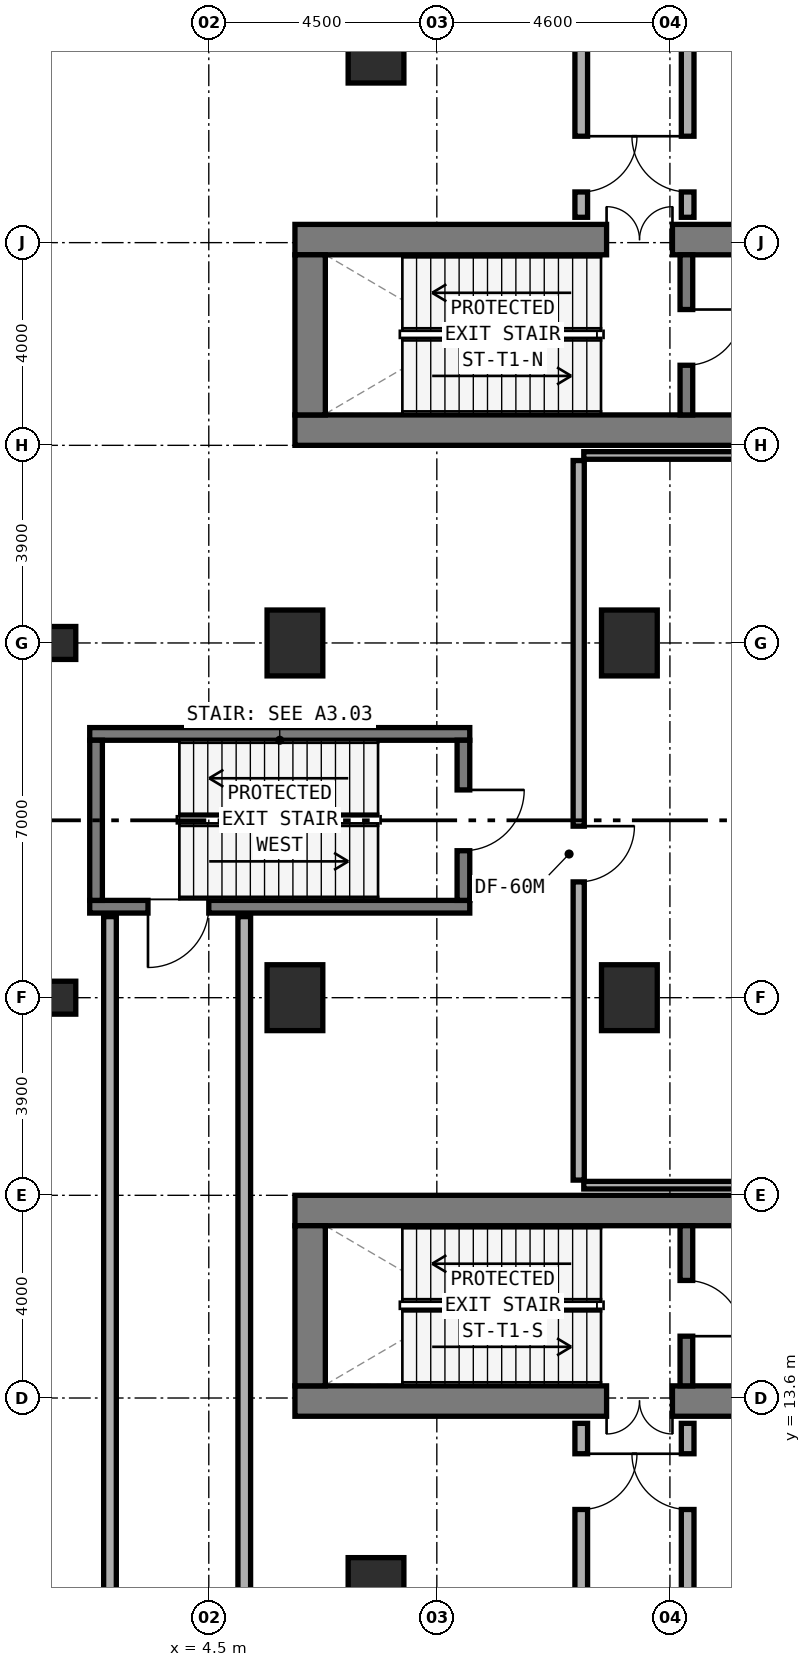
"""IFC4 building model, lengths in metres.
Left out: names, types, materials, properties, quantities, classifications, styles, units other than length and angle.
Written with IfcOpenShell. Run it as: python <this file> out.ifc"""

import sys

from ifc_helpers import new_model, si_unit, direction, frame, frame_2d, origin, origin_2d, place, context, subcontext, project, spatial, rectangle, extrude, element, fill, save


model = new_model("IFC4")
c1 = context("Model", 3, precision=1e-05, world=origin(), true_north=direction((0.0, 1.0)))
c2 = subcontext(c1, "Body", "Model", "MODEL_VIEW")
j1 = project(units=[si_unit("LENGTHUNIT", "METRE"), si_unit("PLANEANGLEUNIT", "RADIAN")], contexts=[c1])
p1 = place(None, origin())
s1 = spatial("IfcSite", under=j1, at=p1, CompositionType="ELEMENT")
p2 = place(p1, origin())
s2 = spatial("IfcBuilding", under=s1, at=p2, CompositionType="ELEMENT")
p3 = place(p2, origin())
s3 = spatial("IfcBuildingStorey", under=s2, at=p3, CompositionType="ELEMENT", Elevation=0.0)
p4 = place(p3, frame((6.2, 32.7, 0.0), z_axis=(0.0, 0.0, 1.0), x_axis=(1.0, 0.0, 0.0)))
e1 = element("IfcWall", 1, at=p4, inside=s3, PredefinedType="SHEAR", context=c2, shape_type="SweptSolid", body=[
    extrude(rectangle(XDim=24.8, YDim=0.6, at=frame_2d((12.4, 0.0))), origin(), (0.0, 0.0, 1.0), 5.4),
])
p5 = place(p3, frame((6.2, 36.46, 0.0), z_axis=(0.0, 0.0, 1.0), x_axis=(1.0, 0.0, 0.0)))
e2 = element("IfcWall", 2, at=p5, inside=s3, PredefinedType="SHEAR", context=c2, shape_type="SweptSolid", body=[
    extrude(rectangle(XDim=24.8, YDim=0.6, at=frame_2d((12.4, 0.0))), origin(), (0.0, 0.0, 1.0), 5.4),
])
p6 = place(p5, frame((9.35, 0.0, 0.0)))
e3 = element("IfcOpeningElement", 3, at=p6, cuts=e2, PredefinedType="OPENING", context=c2, shape_type="SweptSolid", body=[
    extrude(rectangle(XDim=1.2, YDim=2.15, at=frame_2d((0.6, 1.075))), frame((0.0, 0.31, 0.0), z_axis=(0.0, -1.0, 0.0), x_axis=(1.0, 0.0, 0.0)), (0.0, 0.0, 1.0), 0.62),
])
p7 = place(p5, frame((6.15, 0.0, 0.0)))
e4 = element("IfcOpeningElement", 4, at=p7, cuts=e2, PredefinedType="OPENING", context=c2, shape_type="SweptSolid", body=[
    extrude(rectangle(XDim=1.3, YDim=2.15, at=frame_2d((0.65, 1.075))), frame((0.0, 0.31, 0.0), z_axis=(0.0, -1.0, 0.0), x_axis=(1.0, 0.0, 0.0)), (0.0, 0.0, 1.0), 0.62),
])
p8 = place(p5, frame((17.14, 0.0, 0.0)))
e5 = element("IfcOpeningElement", 5, at=p8, cuts=e2, PredefinedType="OPENING", context=c2, shape_type="SweptSolid", body=[
    extrude(rectangle(XDim=0.85, YDim=2.1, at=frame_2d((0.425, 1.05))), frame((0.0, 0.31, 0.0), z_axis=(0.0, -1.0, 0.0), x_axis=(1.0, 0.0, 0.0)), (0.0, 0.0, 1.0), 0.62),
])
p9 = place(p5, frame((18.983, 0.0, 0.0)))
e6 = element("IfcOpeningElement", 6, at=p9, cuts=e2, PredefinedType="OPENING", context=c2, shape_type="SweptSolid", body=[
    extrude(rectangle(XDim=1.1, YDim=2.15, at=frame_2d((0.55, 1.075))), frame((0.0, 0.31, 0.0), z_axis=(0.0, -1.0, 0.0), x_axis=(1.0, 0.0, 0.0)), (0.0, 0.0, 1.0), 0.62),
])
p10 = place(p5, frame((20.85, 0.0, 0.0)))
e7 = element("IfcOpeningElement", 7, at=p10, cuts=e2, PredefinedType="OPENING", context=c2, shape_type="SweptSolid", body=[
    extrude(rectangle(XDim=1.1, YDim=2.15, at=frame_2d((0.55, 1.075))), frame((0.0, 0.31, 0.0), z_axis=(0.0, -1.0, 0.0), x_axis=(1.0, 0.0, 0.0)), (0.0, 0.0, 1.0), 0.62),
])
p11 = place(p5, frame((22.716, 0.0, 0.0)))
e8 = element("IfcOpeningElement", 8, at=p11, cuts=e2, PredefinedType="OPENING", context=c2, shape_type="SweptSolid", body=[
    extrude(rectangle(XDim=1.1, YDim=2.15, at=frame_2d((0.55, 1.075))), frame((0.0, 0.31, 0.0), z_axis=(0.0, -1.0, 0.0), x_axis=(1.0, 0.0, 0.0)), (0.0, 0.0, 1.0), 0.62),
])
p12 = place(p3, frame((6.5, 33.0, 0.0), z_axis=(0.0, 0.0, 1.0), x_axis=(0.0, 1.0, 0.0)))
e9 = element("IfcWall", 9, at=p12, inside=s3, PredefinedType="SHEAR", context=c2, shape_type="SweptSolid", body=[
    extrude(rectangle(XDim=3.16, YDim=0.6, at=frame_2d((1.58, 0.0))), origin(), (0.0, 0.0, 1.0), 5.4),
])
p13 = place(p3, frame((13.925, 33.0, 0.0), z_axis=(0.0, 0.0, 1.0), x_axis=(0.0, 1.0, 0.0)))
e10 = element("IfcWall", 10, at=p13, inside=s3, PredefinedType="STANDARD", context=c2, shape_type="SweptSolid", body=[
    extrude(rectangle(XDim=3.16, YDim=0.25, at=frame_2d((1.58, 0.0))), origin(), (0.0, 0.0, 1.0), 5.05),
])
p14 = place(p13, frame((0.98, 0.0, 0.0)))
e11 = element("IfcOpeningElement", 11, at=p14, cuts=e10, PredefinedType="OPENING", context=c2, shape_type="SweptSolid", body=[
    extrude(rectangle(XDim=1.1, YDim=2.15, at=frame_2d((0.55, 1.075))), frame((0.0, 0.135, 0.0), z_axis=(0.0, -1.0, 0.0), x_axis=(1.0, 0.0, 0.0)), (0.0, 0.0, 1.0), 0.27),
])
p15 = place(p3, frame((6.2, 13.54, 0.0), z_axis=(0.0, 0.0, 1.0), x_axis=(1.0, 0.0, 0.0)))
e12 = element("IfcWall", 12, at=p15, inside=s3, PredefinedType="SHEAR", context=c2, shape_type="SweptSolid", body=[
    extrude(rectangle(XDim=24.8, YDim=0.6, at=frame_2d((12.4, 0.0))), origin(), (0.0, 0.0, 1.0), 5.4),
])
p16 = place(p15, frame((9.35, 0.0, 0.0)))
e13 = element("IfcOpeningElement", 13, at=p16, cuts=e12, PredefinedType="OPENING", context=c2, shape_type="SweptSolid", body=[
    extrude(rectangle(XDim=1.2, YDim=2.15, at=frame_2d((0.6, 1.075))), frame((0.0, 0.31, 0.0), z_axis=(0.0, -1.0, 0.0), x_axis=(1.0, 0.0, 0.0)), (0.0, 0.0, 1.0), 0.62),
])
p17 = place(p15, frame((6.15, 0.0, 0.0)))
e14 = element("IfcOpeningElement", 14, at=p17, cuts=e12, PredefinedType="OPENING", context=c2, shape_type="SweptSolid", body=[
    extrude(rectangle(XDim=1.3, YDim=2.15, at=frame_2d((0.65, 1.075))), frame((0.0, 0.31, 0.0), z_axis=(0.0, -1.0, 0.0), x_axis=(1.0, 0.0, 0.0)), (0.0, 0.0, 1.0), 0.62),
])
p18 = place(p15, frame((17.14, 0.0, 0.0)))
e15 = element("IfcOpeningElement", 15, at=p18, cuts=e12, PredefinedType="OPENING", context=c2, shape_type="SweptSolid", body=[
    extrude(rectangle(XDim=0.85, YDim=2.1, at=frame_2d((0.425, 1.05))), frame((0.0, 0.31, 0.0), z_axis=(0.0, -1.0, 0.0), x_axis=(1.0, 0.0, 0.0)), (0.0, 0.0, 1.0), 0.62),
])
p19 = place(p15, frame((18.983, 0.0, 0.0)))
e16 = element("IfcOpeningElement", 16, at=p19, cuts=e12, PredefinedType="OPENING", context=c2, shape_type="SweptSolid", body=[
    extrude(rectangle(XDim=1.1, YDim=2.15, at=frame_2d((0.55, 1.075))), frame((0.0, 0.31, 0.0), z_axis=(0.0, -1.0, 0.0), x_axis=(1.0, 0.0, 0.0)), (0.0, 0.0, 1.0), 0.62),
])
p20 = place(p15, frame((20.85, 0.0, 0.0)))
e17 = element("IfcOpeningElement", 17, at=p20, cuts=e12, PredefinedType="OPENING", context=c2, shape_type="SweptSolid", body=[
    extrude(rectangle(XDim=1.1, YDim=2.15, at=frame_2d((0.55, 1.075))), frame((0.0, 0.31, 0.0), z_axis=(0.0, -1.0, 0.0), x_axis=(1.0, 0.0, 0.0)), (0.0, 0.0, 1.0), 0.62),
])
p21 = place(p15, frame((22.716, 0.0, 0.0)))
e18 = element("IfcOpeningElement", 18, at=p21, cuts=e12, PredefinedType="OPENING", context=c2, shape_type="SweptSolid", body=[
    extrude(rectangle(XDim=1.1, YDim=2.15, at=frame_2d((0.55, 1.075))), frame((0.0, 0.31, 0.0), z_axis=(0.0, -1.0, 0.0), x_axis=(1.0, 0.0, 0.0)), (0.0, 0.0, 1.0), 0.62),
])
p22 = place(p3, frame((6.2, 17.3, 0.0), z_axis=(0.0, 0.0, 1.0), x_axis=(1.0, 0.0, 0.0)))
e19 = element("IfcWall", 19, at=p22, inside=s3, PredefinedType="SHEAR", context=c2, shape_type="SweptSolid", body=[
    extrude(rectangle(XDim=24.8, YDim=0.6, at=frame_2d((12.4, 0.0))), origin(), (0.0, 0.0, 1.0), 5.4),
])
p23 = place(p3, frame((6.5, 13.84, 0.0), z_axis=(0.0, 0.0, 1.0), x_axis=(0.0, 1.0, 0.0)))
e20 = element("IfcWall", 20, at=p23, inside=s3, PredefinedType="SHEAR", context=c2, shape_type="SweptSolid", body=[
    extrude(rectangle(XDim=3.16, YDim=0.6, at=frame_2d((1.58, 0.0))), origin(), (0.0, 0.0, 1.0), 5.4),
])
p24 = place(p3, frame((13.925, 13.84, 0.0), z_axis=(0.0, 0.0, 1.0), x_axis=(0.0, 1.0, 0.0)))
e21 = element("IfcWall", 21, at=p24, inside=s3, PredefinedType="STANDARD", context=c2, shape_type="SweptSolid", body=[
    extrude(rectangle(XDim=3.16, YDim=0.25, at=frame_2d((1.58, 0.0))), origin(), (0.0, 0.0, 1.0), 5.05),
])
p25 = place(p24, frame((0.98, 0.0, 0.0)))
e22 = element("IfcOpeningElement", 22, at=p25, cuts=e21, PredefinedType="OPENING", context=c2, shape_type="SweptSolid", body=[
    extrude(rectangle(XDim=1.1, YDim=2.15, at=frame_2d((0.55, 1.075))), frame((0.0, 0.135, 0.0), z_axis=(0.0, -1.0, 0.0), x_axis=(1.0, 0.0, 0.0)), (0.0, 0.0, 1.0), 0.27),
])
p26 = place(p3, frame((2.15, 23.295, 0.0), z_axis=(0.0, 0.0, 1.0), x_axis=(1.0, 0.0, 0.0)))
e23 = element("IfcWall", 23, at=p26, inside=s3, PredefinedType="STANDARD", context=c2, shape_type="SweptSolid", body=[
    extrude(rectangle(XDim=7.5, YDim=0.25, at=frame_2d((3.75, 0.0))), origin(), (0.0, 0.0, 1.0), 5.4),
])
p27 = place(p26, frame((1.15, 0.0, 0.0)))
e24 = element("IfcOpeningElement", 24, at=p27, cuts=e23, PredefinedType="OPENING", context=c2, shape_type="SweptSolid", body=[
    extrude(rectangle(XDim=1.2, YDim=2.15, at=frame_2d((0.6, 1.075))), frame((0.0, 0.135, 0.0), z_axis=(0.0, -1.0, 0.0), x_axis=(1.0, 0.0, 0.0)), (0.0, 0.0, 1.0), 0.27),
])
p28 = place(p3, frame((2.15, 26.705, 0.0), z_axis=(0.0, 0.0, 1.0), x_axis=(1.0, 0.0, 0.0)))
e25 = element("IfcWall", 25, at=p28, inside=s3, PredefinedType="STANDARD", context=c2, shape_type="SweptSolid", body=[
    extrude(rectangle(XDim=7.5, YDim=0.25, at=frame_2d((3.75, 0.0))), origin(), (0.0, 0.0, 1.0), 5.4),
])
p29 = place(p3, frame((2.275, 23.42, 0.0), z_axis=(0.0, 0.0, 1.0), x_axis=(0.0, 1.0, 0.0)))
e26 = element("IfcWall", 26, at=p29, inside=s3, PredefinedType="STANDARD", context=c2, shape_type="SweptSolid", body=[
    extrude(rectangle(XDim=3.16, YDim=0.25, at=frame_2d((1.58, 0.0))), origin(), (0.0, 0.0, 1.0), 5.4),
])
p30 = place(p3, frame((9.525, 23.42, 0.0), z_axis=(0.0, 0.0, 1.0), x_axis=(0.0, 1.0, 0.0)))
e27 = element("IfcWall", 27, at=p30, inside=s3, PredefinedType="STANDARD", context=c2, shape_type="SweptSolid", body=[
    extrude(rectangle(XDim=3.16, YDim=0.25, at=frame_2d((1.58, 0.0))), origin(), (0.0, 0.0, 1.0), 5.4),
])
p31 = place(p30, frame((0.98, 0.0, 0.0)))
e28 = element("IfcOpeningElement", 28, at=p31, cuts=e27, PredefinedType="OPENING", context=c2, shape_type="SweptSolid", body=[
    extrude(rectangle(XDim=1.2, YDim=2.15, at=frame_2d((0.6, 1.075))), frame((0.0, 0.135, 0.0), z_axis=(0.0, -1.0, 0.0), x_axis=(1.0, 0.0, 0.0)), (0.0, 0.0, 1.0), 0.27),
])
for number, where, z_axis, x_axis in (
    (29, (6.2, 21.5, 0.0), (0.0, 0.0, 1.0), (1.0, 0.0, 0.0)),
    (30, (6.2, 28.5, 0.0), (0.0, 0.0, 1.0), (1.0, 0.0, 0.0)),
    (31, (7.8, 9.8, 0.0), (0.0, 0.0, 1.0), (1.0, 0.0, 0.0)),
    (32, (7.8, 40.2, 0.0), (0.0, 0.0, 1.0), (1.0, 0.0, 0.0)),
    (33, (12.8, 21.5, 0.0), (0.0, 0.0, 1.0), (1.0, 0.0, 0.0)),
    (34, (12.8, 28.5, 0.0), (0.0, 0.0, 1.0), (1.0, 0.0, 0.0)),
):
    element("IfcColumn", number, at=place(p3, frame(where, z_axis=z_axis, x_axis=x_axis)), inside=s3, PredefinedType="COLUMN", context=c2, shape_type="SweptSolid", body=[
        extrude(rectangle(XDim=1.1, YDim=1.3, at=origin_2d()), origin(), (0.0, 0.0, 1.0), 5.4),
    ])
for number, where, z_axis, x_axis in (
    (35, (1.6, 21.5, 0.0), (0.0, 0.0, 1.0), (1.0, 0.0, 0.0)),
    (36, (1.6, 28.5, 0.0), (0.0, 0.0, 1.0), (1.0, 0.0, 0.0)),
):
    element("IfcColumn", number, at=place(p3, frame(where, z_axis=z_axis, x_axis=x_axis)), inside=s3, PredefinedType="PILASTER", context=c2, shape_type="SweptSolid", body=[
        extrude(rectangle(XDim=0.55, YDim=0.65, at=origin_2d()), origin(), (0.0, 0.0, 1.0), 5.4),
    ])
p32 = place(p3, frame((11.85, 36.9, 0.0), z_axis=(0.0, 0.0, 1.0), x_axis=(0.0, 1.0, 0.0)))
e37 = element("IfcWall", 37, at=p32, inside=s3, PredefinedType="SOLIDWALL", context=c2, shape_type="SweptSolid", body=[
    extrude(rectangle(XDim=12.65, YDim=0.25, at=frame_2d((6.325, 0.0))), origin(), (0.0, 0.0, 1.0), 4.225),
])
p33 = place(p32, frame((0.5, 0.0, 0.0)))
e38 = element("IfcOpeningElement", 38, at=p33, cuts=e37, PredefinedType="OPENING", context=c2, shape_type="SweptSolid", body=[
    extrude(rectangle(XDim=1.1, YDim=2.15, at=frame_2d((0.55, 1.075))), frame((0.0, 0.135, 0.0), z_axis=(0.0, -1.0, 0.0), x_axis=(1.0, 0.0, 0.0)), (0.0, 0.0, 1.0), 0.27),
])
p34 = place(p3, frame((13.95, 36.9, 0.0), z_axis=(0.0, 0.0, 1.0), x_axis=(0.0, 1.0, 0.0)))
e39 = element("IfcWall", 39, at=p34, inside=s3, PredefinedType="SOLIDWALL", context=c2, shape_type="SweptSolid", body=[
    extrude(rectangle(XDim=12.65, YDim=0.25, at=frame_2d((6.325, 0.0))), origin(), (0.0, 0.0, 1.0), 4.225),
])
p35 = place(p34, frame((0.5, 0.0, 0.0)))
e40 = element("IfcOpeningElement", 40, at=p35, cuts=e39, PredefinedType="OPENING", context=c2, shape_type="SweptSolid", body=[
    extrude(rectangle(XDim=1.1, YDim=2.15, at=frame_2d((0.55, 1.075))), frame((0.0, 0.135, 0.0), z_axis=(0.0, -1.0, 0.0), x_axis=(1.0, 0.0, 0.0)), (0.0, 0.0, 1.0), 0.27),
])
p36 = place(p3, frame((11.85, 0.45, 0.0), z_axis=(0.0, 0.0, 1.0), x_axis=(0.0, 1.0, 0.0)))
e41 = element("IfcWall", 41, at=p36, inside=s3, PredefinedType="SOLIDWALL", context=c2, shape_type="SweptSolid", body=[
    extrude(rectangle(XDim=12.65, YDim=0.25, at=frame_2d((6.325, 0.0))), origin(), (0.0, 0.0, 1.0), 4.225),
])
p37 = place(p36, frame((10.95, 0.0, 0.0)))
e42 = element("IfcOpeningElement", 42, at=p37, cuts=e41, PredefinedType="OPENING", context=c2, shape_type="SweptSolid", body=[
    extrude(rectangle(XDim=1.1, YDim=2.15, at=frame_2d((0.55, 1.075))), frame((0.0, 0.135, 0.0), z_axis=(0.0, -1.0, 0.0), x_axis=(1.0, 0.0, 0.0)), (0.0, 0.0, 1.0), 0.27),
])
p38 = place(p3, frame((13.95, 0.45, 0.0), z_axis=(0.0, 0.0, 1.0), x_axis=(0.0, 1.0, 0.0)))
e43 = element("IfcWall", 43, at=p38, inside=s3, PredefinedType="SOLIDWALL", context=c2, shape_type="SweptSolid", body=[
    extrude(rectangle(XDim=12.65, YDim=0.25, at=frame_2d((6.325, 0.0))), origin(), (0.0, 0.0, 1.0), 4.225),
])
p39 = place(p38, frame((10.95, 0.0, 0.0)))
e44 = element("IfcOpeningElement", 44, at=p39, cuts=e43, PredefinedType="OPENING", context=c2, shape_type="SweptSolid", body=[
    extrude(rectangle(XDim=1.1, YDim=2.15, at=frame_2d((0.55, 1.075))), frame((0.0, 0.135, 0.0), z_axis=(0.0, -1.0, 0.0), x_axis=(1.0, 0.0, 0.0)), (0.0, 0.0, 1.0), 0.27),
])
for number, where, z_axis, x_axis in (
    (45, (2.55, 0.48, 0.0), (0.0, 0.0, 1.0), (0.0, 1.0, 0.0)),
    (46, (5.2, 0.48, 0.0), (0.0, 0.0, 1.0), (0.0, 1.0, 0.0)),
):
    element("IfcWall", number, at=place(p3, frame(where, z_axis=z_axis, x_axis=x_axis)), inside=s3, PredefinedType="SOLIDWALL", context=c2, shape_type="SweptSolid", body=[
        extrude(rectangle(XDim=22.62, YDim=0.25, at=frame_2d((11.31, 0.0))), origin(), (0.0, 0.0, 1.0), 4.125),
    ])
for number, where, z_axis, x_axis in (
    (47, (11.9, 17.8, 0.0), (0.0, 0.0, 1.0), (1.0, 0.0, 0.0)),
    (48, (11.9, 32.2, 0.0), (0.0, 0.0, 1.0), (1.0, 0.0, 0.0)),
):
    element("IfcWall", number, at=place(p3, frame(where, z_axis=z_axis, x_axis=x_axis)), inside=s3, PredefinedType="PARTITIONING", context=c2, shape_type="SweptSolid", body=[
        extrude(rectangle(XDim=17.0, YDim=0.15, at=frame_2d((8.5, 0.0))), origin(), (0.0, 0.0, 1.0), 5.05),
    ])
p40 = place(p3, frame((11.8, 17.9, 0.0), z_axis=(0.0, 0.0, 1.0), x_axis=(0.0, 1.0, 0.0)))
e49 = element("IfcWall", 49, at=p40, inside=s3, PredefinedType="SOLIDWALL", context=c2, shape_type="SweptSolid", body=[
    extrude(rectangle(XDim=14.2, YDim=0.22, at=frame_2d((7.1, 0.0))), origin(), (0.0, 0.0, 1.0), 4.125),
])
p41 = place(p40, frame((5.885, 0.0, 0.0)))
e50 = element("IfcOpeningElement", 50, at=p41, cuts=e49, PredefinedType="OPENING", context=c2, shape_type="SweptSolid", body=[
    extrude(rectangle(XDim=1.1, YDim=2.1, at=frame_2d((0.55, 1.05))), frame((0.0, 0.12, 0.0), z_axis=(0.0, -1.0, 0.0), x_axis=(1.0, 0.0, 0.0)), (0.0, 0.0, 1.0), 0.24),
])
p42 = place(p14, frame((1.1, 0.0, 0.0), z_axis=(0.0, 0.0, 1.0), x_axis=(-1.0, 0.0, 0.0)))
e51 = element("IfcDoor", 51, at=p42, inside=s3, OperationType="SINGLE_SWING_LEFT", PredefinedType="DOOR", context=c2, shape_type="SweptSolid", body=[
    extrude(rectangle(XDim=1.1, YDim=2.15, at=frame_2d((0.55, 1.075))), frame((0.0, 0.025, 0.0), z_axis=(0.0, -1.0, 0.0), x_axis=(1.0, 0.0, 0.0)), (0.0, 0.0, 1.0), 0.05),
])
fill(e11, e51)
p43 = place(p7, origin())
e52 = element("IfcDoor", 52, at=p43, inside=s3, OperationType="DOUBLE_DOOR_SINGLE_SWING", PredefinedType="DOOR", context=c2, shape_type="SweptSolid", body=[
    extrude(rectangle(XDim=1.3, YDim=2.15, at=frame_2d((0.65, 1.075))), frame((0.0, 0.025, 0.0), z_axis=(0.0, -1.0, 0.0), x_axis=(1.0, 0.0, 0.0)), (0.0, 0.0, 1.0), 0.05),
])
fill(e4, e52)
p44 = place(p25, frame((1.1, 0.0, 0.0), z_axis=(0.0, 0.0, 1.0), x_axis=(-1.0, 0.0, 0.0)))
e53 = element("IfcDoor", 53, at=p44, inside=s3, OperationType="SINGLE_SWING_RIGHT", PredefinedType="DOOR", context=c2, shape_type="SweptSolid", body=[
    extrude(rectangle(XDim=1.1, YDim=2.15, at=frame_2d((0.55, 1.075))), frame((0.0, 0.025, 0.0), z_axis=(0.0, -1.0, 0.0), x_axis=(1.0, 0.0, 0.0)), (0.0, 0.0, 1.0), 0.05),
])
fill(e22, e53)
p45 = place(p17, frame((1.3, 0.0, 0.0), z_axis=(0.0, 0.0, 1.0), x_axis=(-1.0, 0.0, 0.0)))
e54 = element("IfcDoor", 54, at=p45, inside=s3, OperationType="DOUBLE_DOOR_SINGLE_SWING", PredefinedType="DOOR", context=c2, shape_type="SweptSolid", body=[
    extrude(rectangle(XDim=1.3, YDim=2.15, at=frame_2d((0.65, 1.075))), frame((0.0, 0.025, 0.0), z_axis=(0.0, -1.0, 0.0), x_axis=(1.0, 0.0, 0.0)), (0.0, 0.0, 1.0), 0.05),
])
fill(e14, e54)
p46 = place(p31, frame((1.2, 0.0, 0.0), z_axis=(0.0, 0.0, 1.0), x_axis=(-1.0, 0.0, 0.0)))
e55 = element("IfcDoor", 55, at=p46, inside=s3, OperationType="SINGLE_SWING_LEFT", PredefinedType="DOOR", context=c2, shape_type="SweptSolid", body=[
    extrude(rectangle(XDim=1.2, YDim=2.15, at=frame_2d((0.6, 1.075))), frame((0.0, 0.025, 0.0), z_axis=(0.0, -1.0, 0.0), x_axis=(1.0, 0.0, 0.0)), (0.0, 0.0, 1.0), 0.05),
])
fill(e28, e55)
p47 = place(p27, frame((1.2, 0.0, 0.0), z_axis=(0.0, 0.0, 1.0), x_axis=(-1.0, 0.0, 0.0)))
e56 = element("IfcDoor", 56, at=p47, inside=s3, OperationType="SINGLE_SWING_RIGHT", PredefinedType="DOOR", context=c2, shape_type="SweptSolid", body=[
    extrude(rectangle(XDim=1.2, YDim=2.15, at=frame_2d((0.6, 1.075))), frame((0.0, 0.025, 0.0), z_axis=(0.0, -1.0, 0.0), x_axis=(1.0, 0.0, 0.0)), (0.0, 0.0, 1.0), 0.05),
])
fill(e24, e56)
p48 = place(p33, frame((1.1, 0.0, 0.0), z_axis=(0.0, 0.0, 1.0), x_axis=(-1.0, 0.0, 0.0)))
e57 = element("IfcDoor", 57, at=p48, inside=s3, OperationType="SINGLE_SWING_LEFT", PredefinedType="DOOR", context=c2, shape_type="SweptSolid", body=[
    extrude(rectangle(XDim=1.1, YDim=2.15, at=frame_2d((0.55, 1.075))), frame((0.0, 0.025, 0.0), z_axis=(0.0, -1.0, 0.0), x_axis=(1.0, 0.0, 0.0)), (0.0, 0.0, 1.0), 0.05),
])
fill(e38, e57)
p49 = place(p35, origin())
e58 = element("IfcDoor", 58, at=p49, inside=s3, OperationType="SINGLE_SWING_RIGHT", PredefinedType="DOOR", context=c2, shape_type="SweptSolid", body=[
    extrude(rectangle(XDim=1.1, YDim=2.15, at=frame_2d((0.55, 1.075))), frame((0.0, 0.025, 0.0), z_axis=(0.0, -1.0, 0.0), x_axis=(1.0, 0.0, 0.0)), (0.0, 0.0, 1.0), 0.05),
])
fill(e40, e58)
p50 = place(p37, frame((1.1, 0.0, 0.0), z_axis=(0.0, 0.0, 1.0), x_axis=(-1.0, 0.0, 0.0)))
e59 = element("IfcDoor", 59, at=p50, inside=s3, OperationType="SINGLE_SWING_LEFT", PredefinedType="DOOR", context=c2, shape_type="SweptSolid", body=[
    extrude(rectangle(XDim=1.1, YDim=2.15, at=frame_2d((0.55, 1.075))), frame((0.0, 0.025, 0.0), z_axis=(0.0, -1.0, 0.0), x_axis=(1.0, 0.0, 0.0)), (0.0, 0.0, 1.0), 0.05),
])
fill(e42, e59)
p51 = place(p39, origin())
e60 = element("IfcDoor", 60, at=p51, inside=s3, OperationType="SINGLE_SWING_RIGHT", PredefinedType="DOOR", context=c2, shape_type="SweptSolid", body=[
    extrude(rectangle(XDim=1.1, YDim=2.15, at=frame_2d((0.55, 1.075))), frame((0.0, 0.025, 0.0), z_axis=(0.0, -1.0, 0.0), x_axis=(1.0, 0.0, 0.0)), (0.0, 0.0, 1.0), 0.05),
])
fill(e44, e60)
p52 = place(p41, frame((1.1, 0.0, 0.0), z_axis=(0.0, 0.0, 1.0), x_axis=(-1.0, 0.0, 0.0)))
e61 = element("IfcDoor", 61, at=p52, inside=s3, OperationType="SINGLE_SWING_LEFT", PredefinedType="DOOR", context=c2, shape_type="SweptSolid", body=[
    extrude(rectangle(XDim=1.1, YDim=2.1, at=frame_2d((0.55, 1.05))), frame((0.0, 0.025, 0.0), z_axis=(0.0, -1.0, 0.0), x_axis=(1.0, 0.0, 0.0)), (0.0, 0.0, 1.0), 0.05),
])
fill(e50, e61)
save(model, sys.argv[1])
